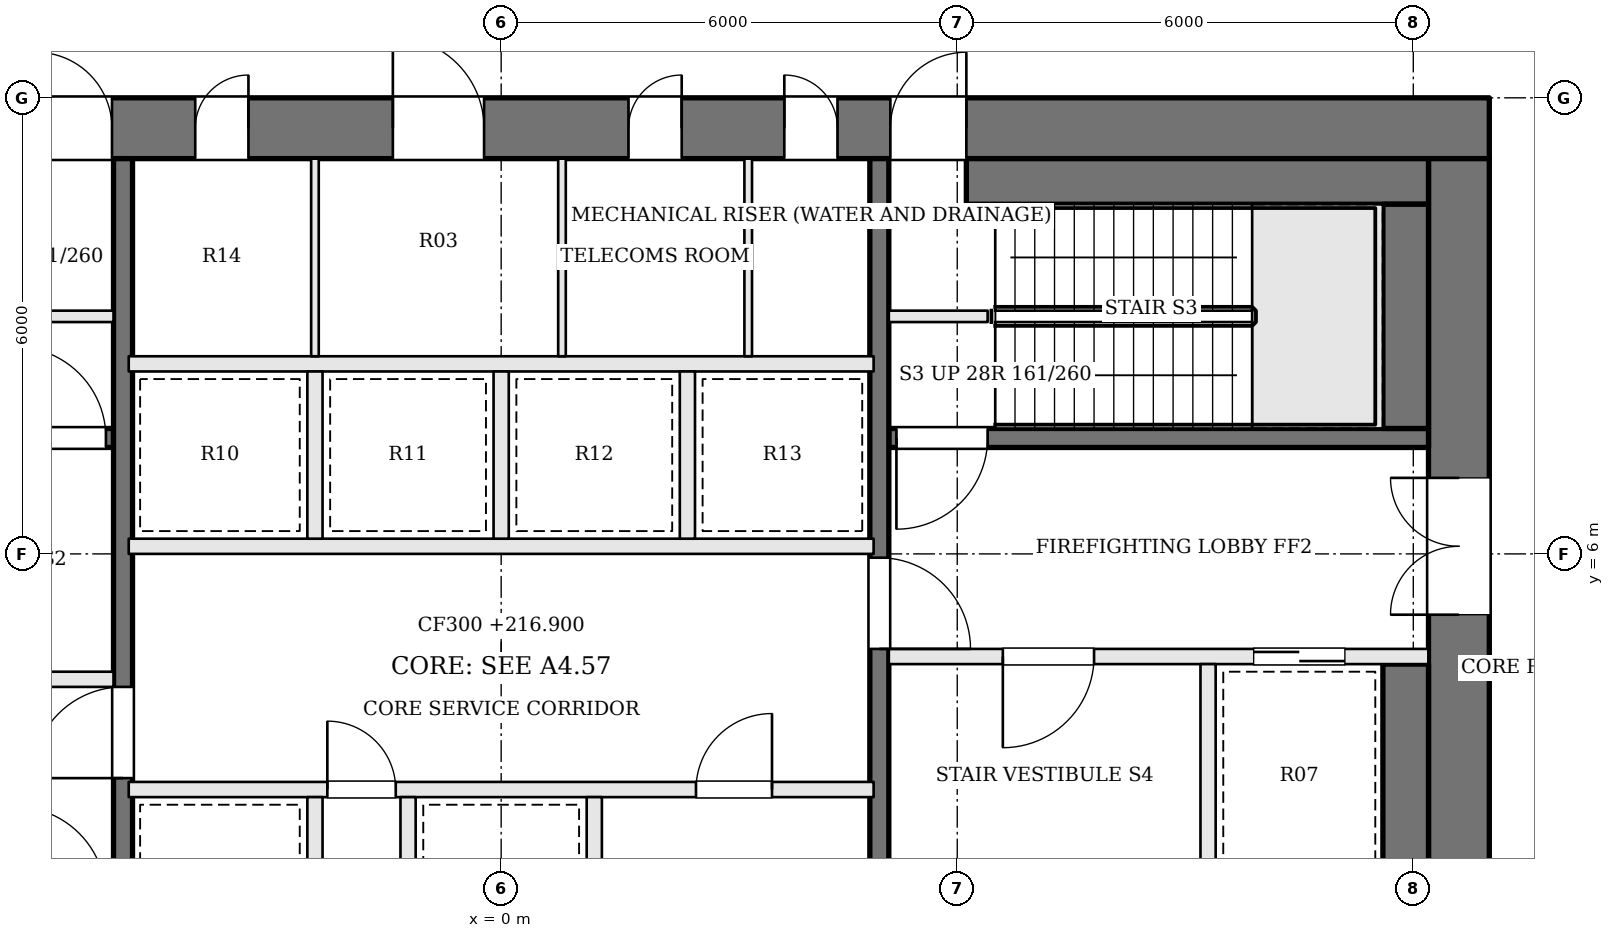
"""IFC4 building model, lengths in metres.
Left out: names, types, materials, properties, quantities, classifications, styles, units other than length and angle.
Written with IfcOpenShell. Run it as: python <this file> out.ifc"""

import sys

from ifc_helpers import new_model, si_unit, direction, frame, frame_2d, origin, place, context, subcontext, project, spatial, rectangle, extrude, element, fill, save


model = new_model("IFC4")
c1 = context("Model", 3, precision=1e-05, world=origin(), true_north=direction((0.0, 1.0)))
c2 = subcontext(c1, "Body", "Model", "MODEL_VIEW")
j1 = project(units=[si_unit("LENGTHUNIT", "METRE"), si_unit("PLANEANGLEUNIT", "RADIAN")], contexts=[c1])
p1 = place(None, origin())
s1 = spatial("IfcSite", under=j1, at=p1, CompositionType="ELEMENT")
p2 = place(p1, origin())
s2 = spatial("IfcBuilding", under=s1, at=p2, CompositionType="ELEMENT")
p3 = place(p2, frame((0.0, 0.0, 216.9)))
s3 = spatial("IfcBuildingStorey", under=s2, at=p3, CompositionType="ELEMENT", Elevation=216.9)
p4 = place(p3, frame((-13.0, 11.6, 0.0), z_axis=(0.0, 0.0, 1.0), x_axis=(1.0, 0.0, 0.0)))
e1 = element("IfcWall", 1, at=p4, inside=s3, PredefinedType="SHEAR", context=c2, shape_type="SweptSolid", body=[
    extrude(rectangle(XDim=26.0, YDim=0.8, at=frame_2d((13.0, 0.0))), origin(), (0.0, 0.0, 1.0), 4.5),
])
p5 = place(p4, frame((8.975, 0.0, 0.0)))
e2 = element("IfcOpeningElement", 2, at=p5, cuts=e1, PredefinedType="OPENING", context=c2, shape_type="SweptSolid", body=[
    extrude(rectangle(XDim=0.7, YDim=2.1, at=frame_2d((0.35, 1.05))), frame((0.0, 0.41, 0.0), z_axis=(0.0, -1.0, 0.0), x_axis=(1.0, 0.0, 0.0)), (0.0, 0.0, 1.0), 0.82),
])
p6 = place(p4, frame((11.575, 0.0, 0.0)))
e3 = element("IfcOpeningElement", 3, at=p6, cuts=e1, PredefinedType="OPENING", context=c2, shape_type="SweptSolid", body=[
    extrude(rectangle(XDim=1.2, YDim=2.1, at=frame_2d((0.6, 1.05))), frame((0.0, 0.41, 0.0), z_axis=(0.0, -1.0, 0.0), x_axis=(1.0, 0.0, 0.0)), (0.0, 0.0, 1.0), 0.82),
])
p7 = place(p4, frame((14.675, 0.0, 0.0)))
e4 = element("IfcOpeningElement", 4, at=p7, cuts=e1, PredefinedType="OPENING", context=c2, shape_type="SweptSolid", body=[
    extrude(rectangle(XDim=0.7, YDim=2.1, at=frame_2d((0.35, 1.05))), frame((0.0, 0.41, 0.0), z_axis=(0.0, -1.0, 0.0), x_axis=(1.0, 0.0, 0.0)), (0.0, 0.0, 1.0), 0.82),
])
p8 = place(p4, frame((16.725, 0.0, 0.0)))
e5 = element("IfcOpeningElement", 5, at=p8, cuts=e1, PredefinedType="OPENING", context=c2, shape_type="SweptSolid", body=[
    extrude(rectangle(XDim=0.7, YDim=2.1, at=frame_2d((0.35, 1.05))), frame((0.0, 0.41, 0.0), z_axis=(0.0, -1.0, 0.0), x_axis=(1.0, 0.0, 0.0)), (0.0, 0.0, 1.0), 0.82),
])
p9 = place(p4, frame((6.88, 0.0, 0.0)))
e6 = element("IfcOpeningElement", 6, at=p9, cuts=e1, PredefinedType="OPENING", context=c2, shape_type="SweptSolid", body=[
    extrude(rectangle(XDim=1.0, YDim=2.1, at=frame_2d((0.5, 1.05))), frame((0.0, 0.41, 0.0), z_axis=(0.0, -1.0, 0.0), x_axis=(1.0, 0.0, 0.0)), (0.0, 0.0, 1.0), 0.82),
])
p10 = place(p4, frame((18.12, 0.0, 0.0)))
e7 = element("IfcOpeningElement", 7, at=p10, cuts=e1, PredefinedType="OPENING", context=c2, shape_type="SweptSolid", body=[
    extrude(rectangle(XDim=1.0, YDim=2.1, at=frame_2d((0.5, 1.05))), frame((0.0, 0.41, 0.0), z_axis=(0.0, -1.0, 0.0), x_axis=(1.0, 0.0, 0.0)), (0.0, 0.0, 1.0), 0.82),
])
p11 = place(p3, frame((12.6, -2.2, 0.0), z_axis=(0.0, 0.0, 1.0), x_axis=(0.0, 1.0, 0.0)))
e8 = element("IfcWall", 8, at=p11, inside=s3, PredefinedType="SHEAR", context=c2, shape_type="SweptSolid", body=[
    extrude(rectangle(XDim=13.4, YDim=0.8, at=frame_2d((6.7, 0.0))), origin(), (0.0, 0.0, 1.0), 4.5),
])
p12 = place(p11, frame((7.4, 0.0, 0.0)))
e9 = element("IfcOpeningElement", 9, at=p12, cuts=e8, PredefinedType="OPENING", context=c2, shape_type="SweptSolid", body=[
    extrude(rectangle(XDim=1.8, YDim=2.1, at=frame_2d((0.9, 1.05))), frame((0.0, 0.41, 0.0), z_axis=(0.0, -1.0, 0.0), x_axis=(1.0, 0.0, 0.0)), (0.0, 0.0, 1.0), 0.82),
])
for number, where, z_axis, x_axis in (
    (10, (6.4, 9.125, 0.0), (0.0, 0.0, 1.0), (-1.0, 0.0, 0.0)),
    (11, (-6.4, 9.125, 0.0), (0.0, 0.0, 1.0), (1.0, 0.0, 0.0)),
):
    element("IfcWall", number, at=place(p3, frame(where, z_axis=z_axis, x_axis=x_axis)), inside=s3, PredefinedType="SOLIDWALL", context=c2, shape_type="SweptSolid", body=[
        extrude(rectangle(XDim=1.3, YDim=0.15, at=frame_2d((0.65, 0.0))), origin(), (0.0, 0.0, 1.0), 4.3),
    ])
p13 = place(p3, frame((12.2, 7.525, 0.0), z_axis=(0.0, 0.0, 1.0), x_axis=(-1.0, 0.0, 0.0)))
e12 = element("IfcWall", 12, at=p13, inside=s3, PredefinedType="SOLIDWALL", context=c2, shape_type="SweptSolid", body=[
    extrude(rectangle(XDim=7.1, YDim=0.25, at=frame_2d((3.55, 0.0))), origin(), (0.0, 0.0, 1.0), 4.3),
])
p14 = place(p13, frame((5.8, 0.0, 0.0)))
e13 = element("IfcOpeningElement", 13, at=p14, cuts=e12, PredefinedType="OPENING", context=c2, shape_type="SweptSolid", body=[
    extrude(rectangle(XDim=1.2, YDim=2.1, at=frame_2d((0.6, 1.05))), frame((0.0, 0.135, 0.0), z_axis=(0.0, -1.0, 0.0), x_axis=(1.0, 0.0, 0.0)), (0.0, 0.0, 1.0), 0.27),
])
p15 = place(p3, frame((-12.2, 4.35, 0.0), z_axis=(0.0, 0.0, 1.0), x_axis=(1.0, 0.0, 0.0)))
e14 = element("IfcWall", 14, at=p15, inside=s3, PredefinedType="SOLIDWALL", context=c2, shape_type="SweptSolid", body=[
    extrude(rectangle(XDim=7.1, YDim=0.2, at=frame_2d((3.55, 0.0))), origin(), (0.0, 0.0, 1.0), 4.3),
])
p16 = place(p15, frame((4.4, 0.0, 0.0)))
e15 = element("IfcOpeningElement", 15, at=p16, cuts=e14, PredefinedType="OPENING", context=c2, shape_type="SweptSolid", body=[
    extrude(rectangle(XDim=1.2, YDim=2.1, at=frame_2d((0.6, 1.05))), frame((0.0, 0.11, 0.0), z_axis=(0.0, -1.0, 0.0), x_axis=(1.0, 0.0, 0.0)), (0.0, 0.0, 1.0), 0.22),
])
p17 = place(p15, frame((1.1, 0.0, 0.0)))
e16 = element("IfcOpeningElement", 16, at=p17, cuts=e14, PredefinedType="OPENING", context=c2, shape_type="SweptSolid", body=[
    extrude(rectangle(XDim=1.2, YDim=2.1, at=frame_2d((0.6, 1.05))), frame((0.0, 0.11, 0.0), z_axis=(0.0, -1.0, 0.0), x_axis=(1.0, 0.0, 0.0)), (0.0, 0.0, 1.0), 0.22),
])
p18 = place(p3, frame((12.2, 4.65, 0.0), z_axis=(0.0, 0.0, 1.0), x_axis=(-1.0, 0.0, 0.0)))
e17 = element("IfcWall", 17, at=p18, inside=s3, PredefinedType="SOLIDWALL", context=c2, shape_type="SweptSolid", body=[
    extrude(rectangle(XDim=7.1, YDim=0.2, at=frame_2d((3.55, 0.0))), origin(), (0.0, 0.0, 1.0), 4.3),
])
p19 = place(p18, frame((4.4, 0.0, 0.0)))
e18 = element("IfcOpeningElement", 18, at=p19, cuts=e17, PredefinedType="OPENING", context=c2, shape_type="SweptSolid", body=[
    extrude(rectangle(XDim=1.2, YDim=2.1, at=frame_2d((0.6, 1.05))), frame((0.0, 0.11, 0.0), z_axis=(0.0, -1.0, 0.0), x_axis=(1.0, 0.0, 0.0)), (0.0, 0.0, 1.0), 0.22),
])
p20 = place(p18, frame((1.1, 0.0, 0.0)))
e19 = element("IfcOpeningElement", 19, at=p20, cuts=e17, PredefinedType="OPENING", context=c2, shape_type="SweptSolid", body=[
    extrude(rectangle(XDim=1.2, YDim=2.1, at=frame_2d((0.6, 1.05))), frame((0.0, 0.11, 0.0), z_axis=(0.0, -1.0, 0.0), x_axis=(1.0, 0.0, 0.0)), (0.0, 0.0, 1.0), 0.22),
])
p21 = place(p3, frame((-12.2, 7.525, 0.0), z_axis=(0.0, 0.0, 1.0), x_axis=(1.0, 0.0, 0.0)))
e20 = element("IfcWall", 20, at=p21, inside=s3, PredefinedType="SOLIDWALL", context=c2, shape_type="SweptSolid", body=[
    extrude(rectangle(XDim=7.1, YDim=0.25, at=frame_2d((3.55, 0.0))), origin(), (0.0, 0.0, 1.0), 4.3),
])
p22 = place(p21, frame((5.8, 0.0, 0.0)))
e21 = element("IfcOpeningElement", 21, at=p22, cuts=e20, PredefinedType="OPENING", context=c2, shape_type="SweptSolid", body=[
    extrude(rectangle(XDim=1.2, YDim=2.1, at=frame_2d((0.6, 1.05))), frame((0.0, 0.135, 0.0), z_axis=(0.0, -1.0, 0.0), x_axis=(1.0, 0.0, 0.0)), (0.0, 0.0, 1.0), 0.27),
])
p23 = place(p3, frame((9.3, 4.55, 0.0), z_axis=(0.0, 0.0, 1.0), x_axis=(0.0, -1.0, 0.0)))
e22 = element("IfcWall", 22, at=p23, inside=s3, PredefinedType="SOLIDWALL", context=c2, shape_type="SweptSolid", body=[
    extrude(rectangle(XDim=3.0, YDim=0.2, at=frame_2d((1.5, 0.0))), origin(), (0.0, 0.0, 1.0), 4.3),
])
p24 = place(p3, frame((-4.975, -2.2, 0.0), z_axis=(0.0, 0.0, 1.0), x_axis=(0.0, 1.0, 0.0)))
e23 = element("IfcWall", 23, at=p24, inside=s3, PredefinedType="SOLIDWALL", context=c2, shape_type="SweptSolid", body=[
    extrude(rectangle(XDim=13.4, YDim=0.25, at=frame_2d((6.7, 0.0))), origin(), (0.0, 0.0, 1.0), 4.3),
])
p25 = place(p24, frame((5.25, 0.0, 0.0)))
e24 = element("IfcOpeningElement", 24, at=p25, cuts=e23, PredefinedType="OPENING", context=c2, shape_type="SweptSolid", body=[
    extrude(rectangle(XDim=1.2, YDim=2.1, at=frame_2d((0.6, 1.05))), frame((0.0, 0.135, 0.0), z_axis=(0.0, -1.0, 0.0), x_axis=(1.0, 0.0, 0.0)), (0.0, 0.0, 1.0), 0.27),
])
p26 = place(p3, frame((4.975, 11.2, 0.0), z_axis=(0.0, 0.0, 1.0), x_axis=(0.0, -1.0, 0.0)))
e25 = element("IfcWall", 25, at=p26, inside=s3, PredefinedType="SOLIDWALL", context=c2, shape_type="SweptSolid", body=[
    extrude(rectangle(XDim=13.4, YDim=0.25, at=frame_2d((6.7, 0.0))), origin(), (0.0, 0.0, 1.0), 4.3),
])
p27 = place(p26, frame((5.25, 0.0, 0.0)))
e26 = element("IfcOpeningElement", 26, at=p27, cuts=e25, PredefinedType="OPENING", context=c2, shape_type="SweptSolid", body=[
    extrude(rectangle(XDim=1.2, YDim=2.1, at=frame_2d((0.6, 1.05))), frame((0.0, 0.135, 0.0), z_axis=(0.0, -1.0, 0.0), x_axis=(1.0, 0.0, 0.0)), (0.0, 0.0, 1.0), 0.27),
])
p28 = place(p3, frame((12.2, 10.9, 0.0), z_axis=(0.0, 0.0, 1.0), x_axis=(-1.0, 0.0, 0.0)))
e27 = element("IfcWall", 27, at=p28, inside=s3, PredefinedType="SOLIDWALL", context=c2, shape_type="SweptSolid", body=[
    extrude(rectangle(XDim=6.08, YDim=0.6, at=frame_2d((3.04, 0.0))), origin(), (0.0, 0.0, 1.0), 4.3),
])
p29 = place(p3, frame((11.9, 10.6, 0.0), z_axis=(0.0, 0.0, 1.0), x_axis=(0.0, -1.0, 0.0)))
e28 = element("IfcWall", 28, at=p29, inside=s3, PredefinedType="SOLIDWALL", context=c2, shape_type="SweptSolid", body=[
    extrude(rectangle(XDim=2.95, YDim=0.6, at=frame_2d((1.475, 0.0))), origin(), (0.0, 0.0, 1.0), 4.3),
])
p30 = place(p3, frame((11.9, 4.55, 0.0), z_axis=(0.0, 0.0, 1.0), x_axis=(0.0, -1.0, 0.0)))
e29 = element("IfcWall", 29, at=p30, inside=s3, PredefinedType="SOLIDWALL", context=c2, shape_type="SweptSolid", body=[
    extrude(rectangle(XDim=3.0, YDim=0.6, at=frame_2d((1.5, 0.0))), origin(), (0.0, 0.0, 1.0), 4.3),
])
p31 = place(p3, frame((-4.9, 2.9, 0.0), z_axis=(0.0, 0.0, 1.0), x_axis=(1.0, 0.0, 0.0)))
e30 = element("IfcWall", 30, at=p31, inside=s3, PredefinedType="SOLIDWALL", context=c2, shape_type="SweptSolid", body=[
    extrude(rectangle(XDim=9.8, YDim=0.2, at=frame_2d((4.9, 0.0))), origin(), (0.0, 0.0, 1.0), 4.3),
])
p32 = place(p31, frame((2.613, 0.0, 0.0)))
e31 = element("IfcOpeningElement", 31, at=p32, cuts=e30, PredefinedType="OPENING", context=c2, shape_type="SweptSolid", body=[
    extrude(rectangle(XDim=0.9, YDim=2.1, at=frame_2d((0.45, 1.05))), frame((0.0, 0.11, 0.0), z_axis=(0.0, -1.0, 0.0), x_axis=(1.0, 0.0, 0.0)), (0.0, 0.0, 1.0), 0.22),
])
p33 = place(p31, frame((7.463, 0.0, 0.0)))
e32 = element("IfcOpeningElement", 32, at=p33, cuts=e30, PredefinedType="OPENING", context=c2, shape_type="SweptSolid", body=[
    extrude(rectangle(XDim=1.0, YDim=2.1, at=frame_2d((0.5, 1.05))), frame((0.0, 0.11, 0.0), z_axis=(0.0, -1.0, 0.0), x_axis=(1.0, 0.0, 0.0)), (0.0, 0.0, 1.0), 0.22),
])
for number, where, z_axis, x_axis in (
    (33, (-4.9, 6.1, 0.0), (0.0, 0.0, 1.0), (1.0, 0.0, 0.0)),
    (34, (-4.9, 8.5, 0.0), (0.0, 0.0, 1.0), (1.0, 0.0, 0.0)),
):
    element("IfcWall", number, at=place(p3, frame(where, z_axis=z_axis, x_axis=x_axis)), inside=s3, PredefinedType="SOLIDWALL", context=c2, shape_type="SweptSolid", body=[
        extrude(rectangle(XDim=9.8, YDim=0.2, at=frame_2d((4.9, 0.0))), origin(), (0.0, 0.0, 1.0), 4.3),
    ])
for number, where, z_axis, x_axis in (
    (35, (-2.45, 0.6, 0.0), (0.0, 0.0, 1.0), (0.0, 1.0, 0.0)),
    (36, (-1.225, 0.6, 0.0), (0.0, 0.0, 1.0), (0.0, 1.0, 0.0)),
    (37, (1.225, 0.6, 0.0), (0.0, 0.0, 1.0), (0.0, 1.0, 0.0)),
    (38, (-2.45, 6.2, 0.0), (0.0, 0.0, 1.0), (0.0, 1.0, 0.0)),
    (39, (0.0, 6.2, 0.0), (0.0, 0.0, 1.0), (0.0, 1.0, 0.0)),
    (40, (2.45, 6.2, 0.0), (0.0, 0.0, 1.0), (0.0, 1.0, 0.0)),
):
    element("IfcWall", number, at=place(p3, frame(where, z_axis=z_axis, x_axis=x_axis)), inside=s3, PredefinedType="SOLIDWALL", context=c2, shape_type="SweptSolid", body=[
        extrude(rectangle(XDim=2.2, YDim=0.2, at=frame_2d((1.1, 0.0))), origin(), (0.0, 0.0, 1.0), 4.3),
    ])
for number, where, z_axis, x_axis in (
    (41, (-2.45, 8.6, 0.0), (0.0, 0.0, 1.0), (0.0, 1.0, 0.0)),
    (42, (0.8, 8.6, 0.0), (0.0, 0.0, 1.0), (0.0, 1.0, 0.0)),
    (43, (3.25, 8.6, 0.0), (0.0, 0.0, 1.0), (0.0, 1.0, 0.0)),
):
    element("IfcWall", number, at=place(p3, frame(where, z_axis=z_axis, x_axis=x_axis)), inside=s3, PredefinedType="PARTITIONING", context=c2, shape_type="SweptSolid", body=[
        extrude(rectangle(XDim=2.6, YDim=0.1, at=frame_2d((1.3, 0.0))), origin(), (0.0, 0.0, 1.0), 4.3),
    ])
p34 = place(p12, origin())
e44 = element("IfcDoor", 44, at=p34, inside=s3, OperationType="DOUBLE_DOOR_SINGLE_SWING", PredefinedType="DOOR", context=c2, shape_type="SweptSolid", body=[
    extrude(rectangle(XDim=1.8, YDim=2.1, at=frame_2d((0.9, 1.05))), frame((0.0, 0.025, 0.0), z_axis=(0.0, -1.0, 0.0), x_axis=(1.0, 0.0, 0.0)), (0.0, 0.0, 1.0), 0.05),
])
fill(e9, e44)
p35 = place(p25, origin())
e45 = element("IfcDoor", 45, at=p35, inside=s3, OperationType="SINGLE_SWING_LEFT", PredefinedType="DOOR", context=c2, shape_type="SweptSolid", body=[
    extrude(rectangle(XDim=1.2, YDim=2.1, at=frame_2d((0.6, 1.05))), frame((0.0, 0.025, 0.0), z_axis=(0.0, -1.0, 0.0), x_axis=(1.0, 0.0, 0.0)), (0.0, 0.0, 1.0), 0.05),
])
fill(e24, e45)
p36 = place(p27, origin())
e46 = element("IfcDoor", 46, at=p36, inside=s3, OperationType="SINGLE_SWING_RIGHT", PredefinedType="DOOR", context=c2, shape_type="SweptSolid", body=[
    extrude(rectangle(XDim=1.2, YDim=2.1, at=frame_2d((0.6, 1.05))), frame((0.0, 0.025, 0.0), z_axis=(0.0, -1.0, 0.0), x_axis=(1.0, 0.0, 0.0)), (0.0, 0.0, 1.0), 0.05),
])
fill(e26, e46)
p37 = place(p19, origin())
e47 = element("IfcDoor", 47, at=p37, inside=s3, OperationType="SINGLE_SWING_RIGHT", PredefinedType="DOOR", context=c2, shape_type="SweptSolid", body=[
    extrude(rectangle(XDim=1.2, YDim=2.1, at=frame_2d((0.6, 1.05))), frame((0.0, 0.025, 0.0), z_axis=(0.0, -1.0, 0.0), x_axis=(1.0, 0.0, 0.0)), (0.0, 0.0, 1.0), 0.05),
])
fill(e18, e47)
p38 = place(p14, origin())
e48 = element("IfcDoor", 48, at=p38, inside=s3, OperationType="SINGLE_SWING_RIGHT", PredefinedType="DOOR", context=c2, shape_type="SweptSolid", body=[
    extrude(rectangle(XDim=1.2, YDim=2.1, at=frame_2d((0.6, 1.05))), frame((0.0, 0.025, 0.0), z_axis=(0.0, -1.0, 0.0), x_axis=(1.0, 0.0, 0.0)), (0.0, 0.0, 1.0), 0.05),
])
fill(e13, e48)
p39 = place(p22, origin())
e49 = element("IfcDoor", 49, at=p39, inside=s3, OperationType="SINGLE_SWING_LEFT", PredefinedType="DOOR", context=c2, shape_type="SweptSolid", body=[
    extrude(rectangle(XDim=1.2, YDim=2.1, at=frame_2d((0.6, 1.05))), frame((0.0, 0.025, 0.0), z_axis=(0.0, -1.0, 0.0), x_axis=(1.0, 0.0, 0.0)), (0.0, 0.0, 1.0), 0.05),
])
fill(e21, e49)
p40 = place(p20, origin())
e50 = element("IfcDoor", 50, at=p40, inside=s3, OperationType="SLIDING_TO_RIGHT", PredefinedType="DOOR", context=c2, shape_type="SweptSolid", body=[
    extrude(rectangle(XDim=1.2, YDim=2.1, at=frame_2d((0.6, 1.05))), frame((0.0, 0.025, 0.0), z_axis=(0.0, -1.0, 0.0), x_axis=(1.0, 0.0, 0.0)), (0.0, 0.0, 1.0), 0.05),
])
fill(e19, e50)
p41 = place(p32, origin())
e51 = element("IfcDoor", 51, at=p41, inside=s3, OperationType="SINGLE_SWING_LEFT", PredefinedType="DOOR", context=c2, shape_type="SweptSolid", body=[
    extrude(rectangle(XDim=0.9, YDim=2.1, at=frame_2d((0.45, 1.05))), frame((0.0, 0.025, 0.0), z_axis=(0.0, -1.0, 0.0), x_axis=(1.0, 0.0, 0.0)), (0.0, 0.0, 1.0), 0.05),
])
fill(e31, e51)
p42 = place(p33, origin())
e52 = element("IfcDoor", 52, at=p42, inside=s3, OperationType="SINGLE_SWING_RIGHT", PredefinedType="DOOR", context=c2, shape_type="SweptSolid", body=[
    extrude(rectangle(XDim=1.0, YDim=2.1, at=frame_2d((0.5, 1.05))), frame((0.0, 0.025, 0.0), z_axis=(0.0, -1.0, 0.0), x_axis=(1.0, 0.0, 0.0)), (0.0, 0.0, 1.0), 0.05),
])
fill(e32, e52)
p43 = place(p5, origin())
e53 = element("IfcDoor", 53, at=p43, inside=s3, OperationType="SINGLE_SWING_RIGHT", PredefinedType="DOOR", context=c2, shape_type="SweptSolid", body=[
    extrude(rectangle(XDim=0.7, YDim=2.1, at=frame_2d((0.35, 1.05))), frame((0.0, 0.025, 0.0), z_axis=(0.0, -1.0, 0.0), x_axis=(1.0, 0.0, 0.0)), (0.0, 0.0, 1.0), 0.05),
])
fill(e2, e53)
p44 = place(p6, origin())
e54 = element("IfcDoor", 54, at=p44, inside=s3, OperationType="SINGLE_SWING_LEFT", PredefinedType="DOOR", context=c2, shape_type="SweptSolid", body=[
    extrude(rectangle(XDim=1.2, YDim=2.1, at=frame_2d((0.6, 1.05))), frame((0.0, 0.025, 0.0), z_axis=(0.0, -1.0, 0.0), x_axis=(1.0, 0.0, 0.0)), (0.0, 0.0, 1.0), 0.05),
])
fill(e3, e54)
p45 = place(p7, origin())
e55 = element("IfcDoor", 55, at=p45, inside=s3, OperationType="SINGLE_SWING_RIGHT", PredefinedType="DOOR", context=c2, shape_type="SweptSolid", body=[
    extrude(rectangle(XDim=0.7, YDim=2.1, at=frame_2d((0.35, 1.05))), frame((0.0, 0.025, 0.0), z_axis=(0.0, -1.0, 0.0), x_axis=(1.0, 0.0, 0.0)), (0.0, 0.0, 1.0), 0.05),
])
fill(e4, e55)
p46 = place(p8, origin())
e56 = element("IfcDoor", 56, at=p46, inside=s3, OperationType="SINGLE_SWING_LEFT", PredefinedType="DOOR", context=c2, shape_type="SweptSolid", body=[
    extrude(rectangle(XDim=0.7, YDim=2.1, at=frame_2d((0.35, 1.05))), frame((0.0, 0.025, 0.0), z_axis=(0.0, -1.0, 0.0), x_axis=(1.0, 0.0, 0.0)), (0.0, 0.0, 1.0), 0.05),
])
fill(e5, e56)
p47 = place(p9, origin())
e57 = element("IfcDoor", 57, at=p47, inside=s3, OperationType="SINGLE_SWING_LEFT", PredefinedType="DOOR", context=c2, shape_type="SweptSolid", body=[
    extrude(rectangle(XDim=1.0, YDim=2.1, at=frame_2d((0.5, 1.05))), frame((0.0, 0.025, 0.0), z_axis=(0.0, -1.0, 0.0), x_axis=(1.0, 0.0, 0.0)), (0.0, 0.0, 1.0), 0.05),
])
fill(e6, e57)
p48 = place(p10, origin())
e58 = element("IfcDoor", 58, at=p48, inside=s3, OperationType="SINGLE_SWING_RIGHT", PredefinedType="DOOR", context=c2, shape_type="SweptSolid", body=[
    extrude(rectangle(XDim=1.0, YDim=2.1, at=frame_2d((0.5, 1.05))), frame((0.0, 0.025, 0.0), z_axis=(0.0, -1.0, 0.0), x_axis=(1.0, 0.0, 0.0)), (0.0, 0.0, 1.0), 0.05),
])
fill(e7, e58)
save(model, sys.argv[1])
